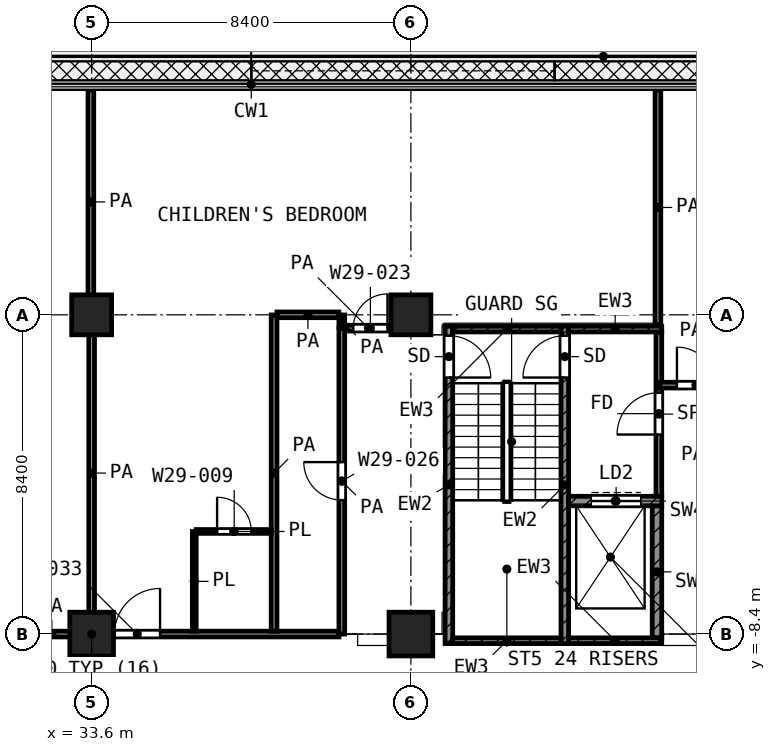
"""IFC4 building model, lengths in metres.
Left out: names, types, materials, properties, quantities, classifications, styles, units other than length and angle.
Written with IfcOpenShell. Run it as: python <this file> out.ifc"""

import sys

from ifc_helpers import new_model, si_unit, direction, frame, frame_2d, origin, origin_2d, place, context, subcontext, project, spatial, rectangle, extrude, element, fill, save


model = new_model("IFC4")
c1 = context("Model", 3, precision=1e-05, world=origin(), true_north=direction((0.0, 1.0)))
c2 = subcontext(c1, "Body", "Model", "MODEL_VIEW")
j1 = project(units=[si_unit("LENGTHUNIT", "METRE"), si_unit("PLANEANGLEUNIT", "RADIAN")], contexts=[c1])
p1 = place(None, origin())
s1 = spatial("IfcSite", under=j1, at=p1, CompositionType="ELEMENT")
p2 = place(p1, origin())
s2 = spatial("IfcBuilding", under=s1, at=p2, CompositionType="ELEMENT")
p3 = place(p2, frame((0.0, 0.0, 128.2)))
s3 = spatial("IfcBuildingStorey", under=s2, at=p3, CompositionType="ELEMENT", Elevation=128.2)
for number, where, z_axis, x_axis in (
    (1, (33.6, 0.0, 0.0), (0.0, 0.0, 1.0), (1.0, 0.0, 0.0)),
    (2, (42.0, 0.0, 0.0), (0.0, 0.0, 1.0), (1.0, 0.0, 0.0)),
):
    element("IfcColumn", number, at=place(p3, frame(where, z_axis=z_axis, x_axis=x_axis)), inside=s3, PredefinedType="COLUMN", context=c2, shape_type="SweptSolid", body=[
        extrude(rectangle(XDim=1.05, YDim=1.05, at=origin_2d()), origin(), (0.0, 0.0, 1.0), 4.2),
    ])
for number, where, z_axis, x_axis in (
    (3, (33.6, -8.4, 0.0), (0.0, 0.0, 1.0), (1.0, 0.0, 0.0)),
    (4, (42.0, -8.4, 0.0), (0.0, 0.0, 1.0), (1.0, 0.0, 0.0)),
):
    element("IfcColumn", number, at=place(p3, frame(where, z_axis=z_axis, x_axis=x_axis)), inside=s3, PredefinedType="COLUMN", context=c2, shape_type="SweptSolid", body=[
        extrude(rectangle(XDim=1.15, YDim=1.15, at=origin_2d()), origin(), (0.0, 0.0, 1.0), 4.2),
    ])
p4 = place(p3, frame((43.0, -8.65, 0.0), z_axis=(0.0, 0.0, 1.0), x_axis=(0.0, 1.0, 0.0)))
e5 = element("IfcWall", 5, at=p4, inside=s3, PredefinedType="SHEAR", context=c2, shape_type="SweptSolid", body=[
    extrude(rectangle(XDim=8.35, YDim=0.2, at=frame_2d((4.175, 0.0))), origin(), (0.0, 0.0, 1.0), 3.6),
])
p5 = place(p4, frame((7.0, 0.0, 0.0)))
e6 = element("IfcOpeningElement", 6, at=p5, cuts=e5, PredefinedType="OPENING", context=c2, shape_type="SweptSolid", body=[
    extrude(rectangle(XDim=1.1, YDim=2.1, at=frame_2d((0.55, 1.05))), frame((0.0, 0.11, 0.0), z_axis=(0.0, -1.0, 0.0), x_axis=(1.0, 0.0, 0.0)), (0.0, 0.0, 1.0), 0.22),
])
p6 = place(p3, frame((46.05, -8.65, 0.0), z_axis=(0.0, 0.0, 1.0), x_axis=(0.0, 1.0, 0.0)))
e7 = element("IfcWall", 7, at=p6, inside=s3, PredefinedType="SHEAR", context=c2, shape_type="SweptSolid", body=[
    extrude(rectangle(XDim=8.35, YDim=0.2, at=frame_2d((4.175, 0.0))), origin(), (0.0, 0.0, 1.0), 3.6),
])
p7 = place(p6, frame((7.0, 0.0, 0.0)))
e8 = element("IfcOpeningElement", 8, at=p7, cuts=e7, PredefinedType="OPENING", context=c2, shape_type="SweptSolid", body=[
    extrude(rectangle(XDim=1.1, YDim=2.1, at=frame_2d((0.55, 1.05))), frame((0.0, 0.11, 0.0), z_axis=(0.0, -1.0, 0.0), x_axis=(1.0, 0.0, 0.0)), (0.0, 0.0, 1.0), 0.22),
])
p8 = place(p3, frame((43.1, -0.375, 0.0), z_axis=(0.0, 0.0, 1.0), x_axis=(1.0, 0.0, 0.0)))
e9 = element("IfcWall", 9, at=p8, inside=s3, PredefinedType="SHEAR", context=c2, shape_type="SweptSolid", body=[
    extrude(rectangle(XDim=2.85, YDim=0.15, at=frame_2d((1.425, 0.0))), origin(), (0.0, 0.0, 1.0), 3.6),
])
p9 = place(p3, frame((46.15, -0.375, 0.0), z_axis=(0.0, 0.0, 1.0), x_axis=(1.0, 0.0, 0.0)))
e10 = element("IfcWall", 10, at=p9, inside=s3, PredefinedType="SHEAR", context=c2, shape_type="SweptSolid", body=[
    extrude(rectangle(XDim=2.45, YDim=0.15, at=frame_2d((1.225, 0.0))), origin(), (0.0, 0.0, 1.0), 3.6),
])
p10 = place(p3, frame((43.1, -8.575, 0.0), z_axis=(0.0, 0.0, 1.0), x_axis=(1.0, 0.0, 0.0)))
e11 = element("IfcWall", 11, at=p10, inside=s3, PredefinedType="SHEAR", context=c2, shape_type="SweptSolid", body=[
    extrude(rectangle(XDim=2.85, YDim=0.15, at=frame_2d((1.425, 0.0))), origin(), (0.0, 0.0, 1.0), 3.6),
])
p11 = place(p3, frame((46.15, -8.575, 0.0), z_axis=(0.0, 0.0, 1.0), x_axis=(1.0, 0.0, 0.0)))
e12 = element("IfcWall", 12, at=p11, inside=s3, PredefinedType="SHEAR", context=c2, shape_type="SweptSolid", body=[
    extrude(rectangle(XDim=2.45, YDim=0.15, at=frame_2d((1.225, 0.0))), origin(), (0.0, 0.0, 1.0), 3.6),
])
p12 = place(p3, frame((46.15, -4.9, 0.0), z_axis=(0.0, 0.0, 1.0), x_axis=(1.0, 0.0, 0.0)))
e13 = element("IfcWall", 13, at=p12, inside=s3, PredefinedType="SHEAR", context=c2, shape_type="SweptSolid", body=[
    extrude(rectangle(XDim=2.45, YDim=0.25, at=frame_2d((1.225, 0.0))), origin(), (0.0, 0.0, 1.0), 3.6),
])
p13 = place(p12, frame((0.6, 0.0, 0.0)))
e14 = element("IfcOpeningElement", 14, at=p13, cuts=e13, PredefinedType="OPENING", context=c2, shape_type="SweptSolid", body=[
    extrude(rectangle(XDim=1.3, YDim=2.1, at=frame_2d((0.65, 1.05))), frame((0.0, 0.135, 0.0), z_axis=(0.0, -1.0, 0.0), x_axis=(1.0, 0.0, 0.0)), (0.0, 0.0, 1.0), 0.27),
])
p14 = place(p3, frame((48.475, -8.5, 0.0), z_axis=(0.0, 0.0, 1.0), x_axis=(0.0, 1.0, 0.0)))
e15 = element("IfcWall", 15, at=p14, inside=s3, PredefinedType="SHEAR", context=c2, shape_type="SweptSolid", body=[
    extrude(rectangle(XDim=3.475, YDim=0.25, at=frame_2d((1.738, 0.0))), origin(), (0.0, 0.0, 1.0), 3.6),
])
p15 = place(p3, frame((48.525, -4.775, 0.0), z_axis=(0.0, 0.0, 1.0), x_axis=(0.0, 1.0, 0.0)))
e16 = element("IfcWall", 16, at=p15, inside=s3, PredefinedType="PARTITIONING", context=c2, shape_type="SweptSolid", body=[
    extrude(rectangle(XDim=4.325, YDim=0.15, at=frame_2d((2.163, 0.0))), origin(), (0.0, 0.0, 1.0), 3.6),
])
p16 = place(p15, frame((1.625, 0.0, 0.0)))
e17 = element("IfcOpeningElement", 17, at=p16, cuts=e16, PredefinedType="OPENING", context=c2, shape_type="SweptSolid", body=[
    extrude(rectangle(XDim=1.1, YDim=2.1, at=frame_2d((0.55, 1.05))), frame((0.0, 0.085, 0.0), z_axis=(0.0, -1.0, 0.0), x_axis=(1.0, 0.0, 0.0)), (0.0, 0.0, 1.0), 0.17),
])
p17 = place(p3, frame((36.352, -5.7, 0.0), z_axis=(0.0, 0.0, 1.0), x_axis=(1.0, 0.0, 0.0)))
e18 = element("IfcWall", 18, at=p17, inside=s3, PredefinedType="PARTITIONING", context=c2, shape_type="SweptSolid", body=[
    extrude(rectangle(XDim=1.973, YDim=0.1, at=frame_2d((0.986, 0.0))), origin(), (0.0, 0.0, 1.0), 3.6),
])
p18 = place(p17, frame((0.549, 0.0, 0.0)))
e19 = element("IfcOpeningElement", 19, at=p18, cuts=e18, PredefinedType="OPENING", context=c2, shape_type="SweptSolid", body=[
    extrude(rectangle(XDim=0.9, YDim=2.1, at=frame_2d((0.45, 1.05))), frame((0.0, 0.06, 0.0), z_axis=(0.0, -1.0, 0.0), x_axis=(1.0, 0.0, 0.0)), (0.0, 0.0, 1.0), 0.12),
])
p19 = place(p3, frame((36.3, -8.325, 0.0), z_axis=(0.0, 0.0, 1.0), x_axis=(0.0, 1.0, 0.0)))
e20 = element("IfcWall", 20, at=p19, inside=s3, PredefinedType="PARTITIONING", context=c2, shape_type="SweptSolid", body=[
    extrude(rectangle(XDim=2.624, YDim=0.1, at=frame_2d((1.312, 0.0))), origin(), (0.0, 0.0, 1.0), 3.6),
])
p20 = place(p3, frame((25.0, -8.4, 0.0), z_axis=(0.0, 0.0, 1.0), x_axis=(1.0, 0.0, 0.0)))
e21 = element("IfcWall", 21, at=p20, inside=s3, PredefinedType="PARTITIONING", context=c2, shape_type="SweptSolid", body=[
    extrude(rectangle(XDim=15.107, YDim=0.15, at=frame_2d((7.553, 0.0))), origin(), (0.0, 0.0, 1.0), 3.6),
])
p21 = place(p20, frame((3.65, 0.0, 0.0)))
e22 = element("IfcOpeningElement", 22, at=p21, cuts=e21, PredefinedType="OPENING", context=c2, shape_type="SweptSolid", body=[
    extrude(rectangle(XDim=1.5, YDim=2.1, at=frame_2d((0.75, 1.05))), frame((0.0, 0.085, 0.0), z_axis=(0.0, -1.0, 0.0), x_axis=(1.0, 0.0, 0.0)), (0.0, 0.0, 1.0), 0.17),
])
p22 = place(p20, frame((9.2, 0.0, 0.0)))
e23 = element("IfcOpeningElement", 23, at=p22, cuts=e21, PredefinedType="OPENING", context=c2, shape_type="SweptSolid", body=[
    extrude(rectangle(XDim=1.2, YDim=2.1, at=frame_2d((0.6, 1.05))), frame((0.0, 0.085, 0.0), z_axis=(0.0, -1.0, 0.0), x_axis=(1.0, 0.0, 0.0)), (0.0, 0.0, 1.0), 0.17),
])
p23 = place(p3, frame((48.55, -1.85, 0.0), z_axis=(0.0, 0.0, 1.0), x_axis=(1.0, 0.0, 0.0)))
e24 = element("IfcWall", 24, at=p23, inside=s3, PredefinedType="PARTITIONING", context=c2, shape_type="SweptSolid", body=[
    extrude(rectangle(XDim=2.297, YDim=0.15, at=frame_2d((1.148, 0.0))), origin(), (0.0, 0.0, 1.0), 3.6),
])
p24 = place(p23, frame((0.45, 0.0, 0.0)))
e25 = element("IfcOpeningElement", 25, at=p24, cuts=e24, PredefinedType="OPENING", context=c2, shape_type="SweptSolid", body=[
    extrude(rectangle(XDim=1.0, YDim=2.1, at=frame_2d((0.5, 1.05))), frame((0.0, 0.085, 0.0), z_axis=(0.0, -1.0, 0.0), x_axis=(1.0, 0.0, 0.0)), (0.0, 0.0, 1.0), 0.17),
])
p25 = place(p3, frame((40.277, -0.35, 0.0), z_axis=(0.0, 0.0, 1.0), x_axis=(1.0, 0.0, 0.0)))
e26 = element("IfcWall", 26, at=p25, inside=s3, PredefinedType="PARTITIONING", context=c2, shape_type="SweptSolid", body=[
    extrude(rectangle(XDim=1.211, YDim=0.15, at=frame_2d((0.605, 0.0))), origin(), (0.0, 0.0, 1.0), 3.6),
])
p26 = place(p25, frame((0.207, 0.0, 0.0)))
e27 = element("IfcOpeningElement", 27, at=p26, cuts=e26, PredefinedType="OPENING", context=c2, shape_type="SweptSolid", body=[
    extrude(rectangle(XDim=0.9, YDim=2.1, at=frame_2d((0.45, 1.05))), frame((0.0, 0.085, 0.0), z_axis=(0.0, -1.0, 0.0), x_axis=(1.0, 0.0, 0.0)), (0.0, 0.0, 1.0), 0.17),
])
p27 = place(p3, frame((38.478, 0.0, 0.0), z_axis=(0.0, 0.0, 1.0), x_axis=(1.0, 0.0, 0.0)))
e28 = element("IfcWall", 28, at=p27, inside=s3, PredefinedType="PARTITIONING", context=c2, shape_type="SweptSolid", body=[
    extrude(rectangle(XDim=1.626, YDim=0.15, at=frame_2d((0.813, 0.0))), origin(), (0.0, 0.0, 1.0), 3.6),
])
p28 = place(p3, frame((33.58, 0.02, 0.0), z_axis=(0.0, 0.0, 1.0), x_axis=(0.0, 1.0, 0.0)))
e29 = element("IfcWall", 29, at=p28, inside=s3, PredefinedType="PARTITIONING", context=c2, shape_type="SweptSolid", body=[
    extrude(rectangle(XDim=5.9, YDim=0.15, at=frame_2d((2.95, 0.0))), origin(), (0.0, 0.0, 1.0), 3.6),
])
for number, where, z_axis, x_axis in (
    (30, (33.6, -8.325, 0.0), (0.0, 0.0, 1.0), (0.0, 1.0, 0.0)),
    (31, (38.4, -8.325, 0.0), (0.0, 0.0, 1.0), (0.0, 1.0, 0.0)),
):
    element("IfcWall", number, at=place(p3, frame(where, z_axis=z_axis, x_axis=x_axis)), inside=s3, PredefinedType="PARTITIONING", context=c2, shape_type="SweptSolid", body=[
        extrude(rectangle(XDim=8.322, YDim=0.15, at=frame_2d((4.161, 0.0))), origin(), (0.0, 0.0, 1.0), 3.6),
    ])
p29 = place(p3, frame((40.182, -8.4, 0.0), z_axis=(0.0, 0.0, 1.0), x_axis=(0.0, 1.0, 0.0)))
e32 = element("IfcWall", 32, at=p29, inside=s3, PredefinedType="PARTITIONING", context=c2, shape_type="SweptSolid", body=[
    extrude(rectangle(XDim=8.05, YDim=0.15, at=frame_2d((4.025, 0.0))), origin(), (0.0, 0.0, 1.0), 3.6),
])
p30 = place(p29, frame((3.525, 0.0, 0.0)))
e33 = element("IfcOpeningElement", 33, at=p30, cuts=e32, PredefinedType="OPENING", context=c2, shape_type="SweptSolid", body=[
    extrude(rectangle(XDim=1.0, YDim=2.1, at=frame_2d((0.5, 1.05))), frame((0.0, 0.085, 0.0), z_axis=(0.0, -1.0, 0.0), x_axis=(1.0, 0.0, 0.0)), (0.0, 0.0, 1.0), 0.17),
])
p31 = place(p3, frame((40.182, -0.33, 0.0), z_axis=(0.0, 0.0, 1.0), x_axis=(0.0, 1.0, 0.0)))
e34 = element("IfcWall", 34, at=p31, inside=s3, PredefinedType="PARTITIONING", context=c2, shape_type="SweptSolid", body=[
    extrude(rectangle(XDim=0.327, YDim=0.15, at=frame_2d((0.164, 0.0))), origin(), (0.0, 0.0, 1.0), 3.6),
])
p32 = place(p3, frame((48.5, -0.27, 0.0), z_axis=(0.0, 0.0, 1.0), x_axis=(0.0, 1.0, 0.0)))
e35 = element("IfcWall", 35, at=p32, inside=s3, PredefinedType="PARTITIONING", context=c2, shape_type="SweptSolid", body=[
    extrude(rectangle(XDim=6.19, YDim=0.15, at=frame_2d((3.095, 0.0))), origin(), (0.0, 0.0, 1.0), 3.6),
])
p33 = place(p5, frame((1.1, 0.0, 0.0), z_axis=(0.0, 0.0, 1.0), x_axis=(-1.0, 0.0, 0.0)))
e36 = element("IfcDoor", 36, at=p33, inside=s3, OperationType="SINGLE_SWING_LEFT", PredefinedType="DOOR", context=c2, shape_type="SweptSolid", body=[
    extrude(rectangle(XDim=1.1, YDim=2.1, at=frame_2d((0.55, 1.05))), frame((0.0, 0.025, 0.0), z_axis=(0.0, -1.0, 0.0), x_axis=(1.0, 0.0, 0.0)), (0.0, 0.0, 1.0), 0.05),
])
fill(e6, e36)
p34 = place(p7, origin())
e37 = element("IfcDoor", 37, at=p34, inside=s3, OperationType="SINGLE_SWING_LEFT", PredefinedType="DOOR", context=c2, shape_type="SweptSolid", body=[
    extrude(rectangle(XDim=1.1, YDim=2.1, at=frame_2d((0.55, 1.05))), frame((0.0, 0.025, 0.0), z_axis=(0.0, -1.0, 0.0), x_axis=(1.0, 0.0, 0.0)), (0.0, 0.0, 1.0), 0.05),
])
fill(e8, e37)
p35 = place(p13, origin())
e38 = element("IfcDoor", 38, at=p35, inside=s3, OperationType="DOUBLE_DOOR_SLIDING", PredefinedType="DOOR", context=c2, shape_type="SweptSolid", body=[
    extrude(rectangle(XDim=1.3, YDim=2.1, at=frame_2d((0.65, 1.05))), frame((0.0, 0.025, 0.0), z_axis=(0.0, -1.0, 0.0), x_axis=(1.0, 0.0, 0.0)), (0.0, 0.0, 1.0), 0.05),
])
fill(e14, e38)
p36 = place(p16, origin())
e39 = element("IfcDoor", 39, at=p36, inside=s3, OperationType="SINGLE_SWING_LEFT", PredefinedType="DOOR", context=c2, shape_type="SweptSolid", body=[
    extrude(rectangle(XDim=1.1, YDim=2.1, at=frame_2d((0.55, 1.05))), frame((0.0, 0.025, 0.0), z_axis=(0.0, -1.0, 0.0), x_axis=(1.0, 0.0, 0.0)), (0.0, 0.0, 1.0), 0.05),
])
fill(e17, e39)
p37 = place(p22, origin())
e40 = element("IfcDoor", 40, at=p37, inside=s3, OperationType="SINGLE_SWING_RIGHT", PredefinedType="DOOR", context=c2, shape_type="SweptSolid", body=[
    extrude(rectangle(XDim=1.2, YDim=2.1, at=frame_2d((0.6, 1.05))), frame((0.0, 0.025, 0.0), z_axis=(0.0, -1.0, 0.0), x_axis=(1.0, 0.0, 0.0)), (0.0, 0.0, 1.0), 0.05),
])
fill(e23, e40)
p38 = place(p26, origin())
e41 = element("IfcDoor", 41, at=p38, inside=s3, OperationType="SINGLE_SWING_RIGHT", PredefinedType="DOOR", context=c2, shape_type="SweptSolid", body=[
    extrude(rectangle(XDim=0.9, YDim=2.1, at=frame_2d((0.45, 1.05))), frame((0.0, 0.025, 0.0), z_axis=(0.0, -1.0, 0.0), x_axis=(1.0, 0.0, 0.0)), (0.0, 0.0, 1.0), 0.05),
])
fill(e27, e41)
p39 = place(p18, origin())
e42 = element("IfcDoor", 42, at=p39, inside=s3, OperationType="SINGLE_SWING_LEFT", PredefinedType="DOOR", context=c2, shape_type="SweptSolid", body=[
    extrude(rectangle(XDim=0.9, YDim=2.1, at=frame_2d((0.45, 1.05))), frame((0.0, 0.025, 0.0), z_axis=(0.0, -1.0, 0.0), x_axis=(1.0, 0.0, 0.0)), (0.0, 0.0, 1.0), 0.05),
])
fill(e19, e42)
p40 = place(p30, origin())
e43 = element("IfcDoor", 43, at=p40, inside=s3, OperationType="SINGLE_SWING_RIGHT", PredefinedType="DOOR", context=c2, shape_type="SweptSolid", body=[
    extrude(rectangle(XDim=1.0, YDim=2.1, at=frame_2d((0.5, 1.05))), frame((0.0, 0.025, 0.0), z_axis=(0.0, -1.0, 0.0), x_axis=(1.0, 0.0, 0.0)), (0.0, 0.0, 1.0), 0.05),
])
fill(e33, e43)
p41 = place(p24, origin())
e44 = element("IfcDoor", 44, at=p41, inside=s3, OperationType="SINGLE_SWING_LEFT", PredefinedType="DOOR", context=c2, shape_type="SweptSolid", body=[
    extrude(rectangle(XDim=1.0, YDim=2.1, at=frame_2d((0.5, 1.05))), frame((0.0, 0.025, 0.0), z_axis=(0.0, -1.0, 0.0), x_axis=(1.0, 0.0, 0.0)), (0.0, 0.0, 1.0), 0.05),
])
fill(e25, e44)
save(model, sys.argv[1])
